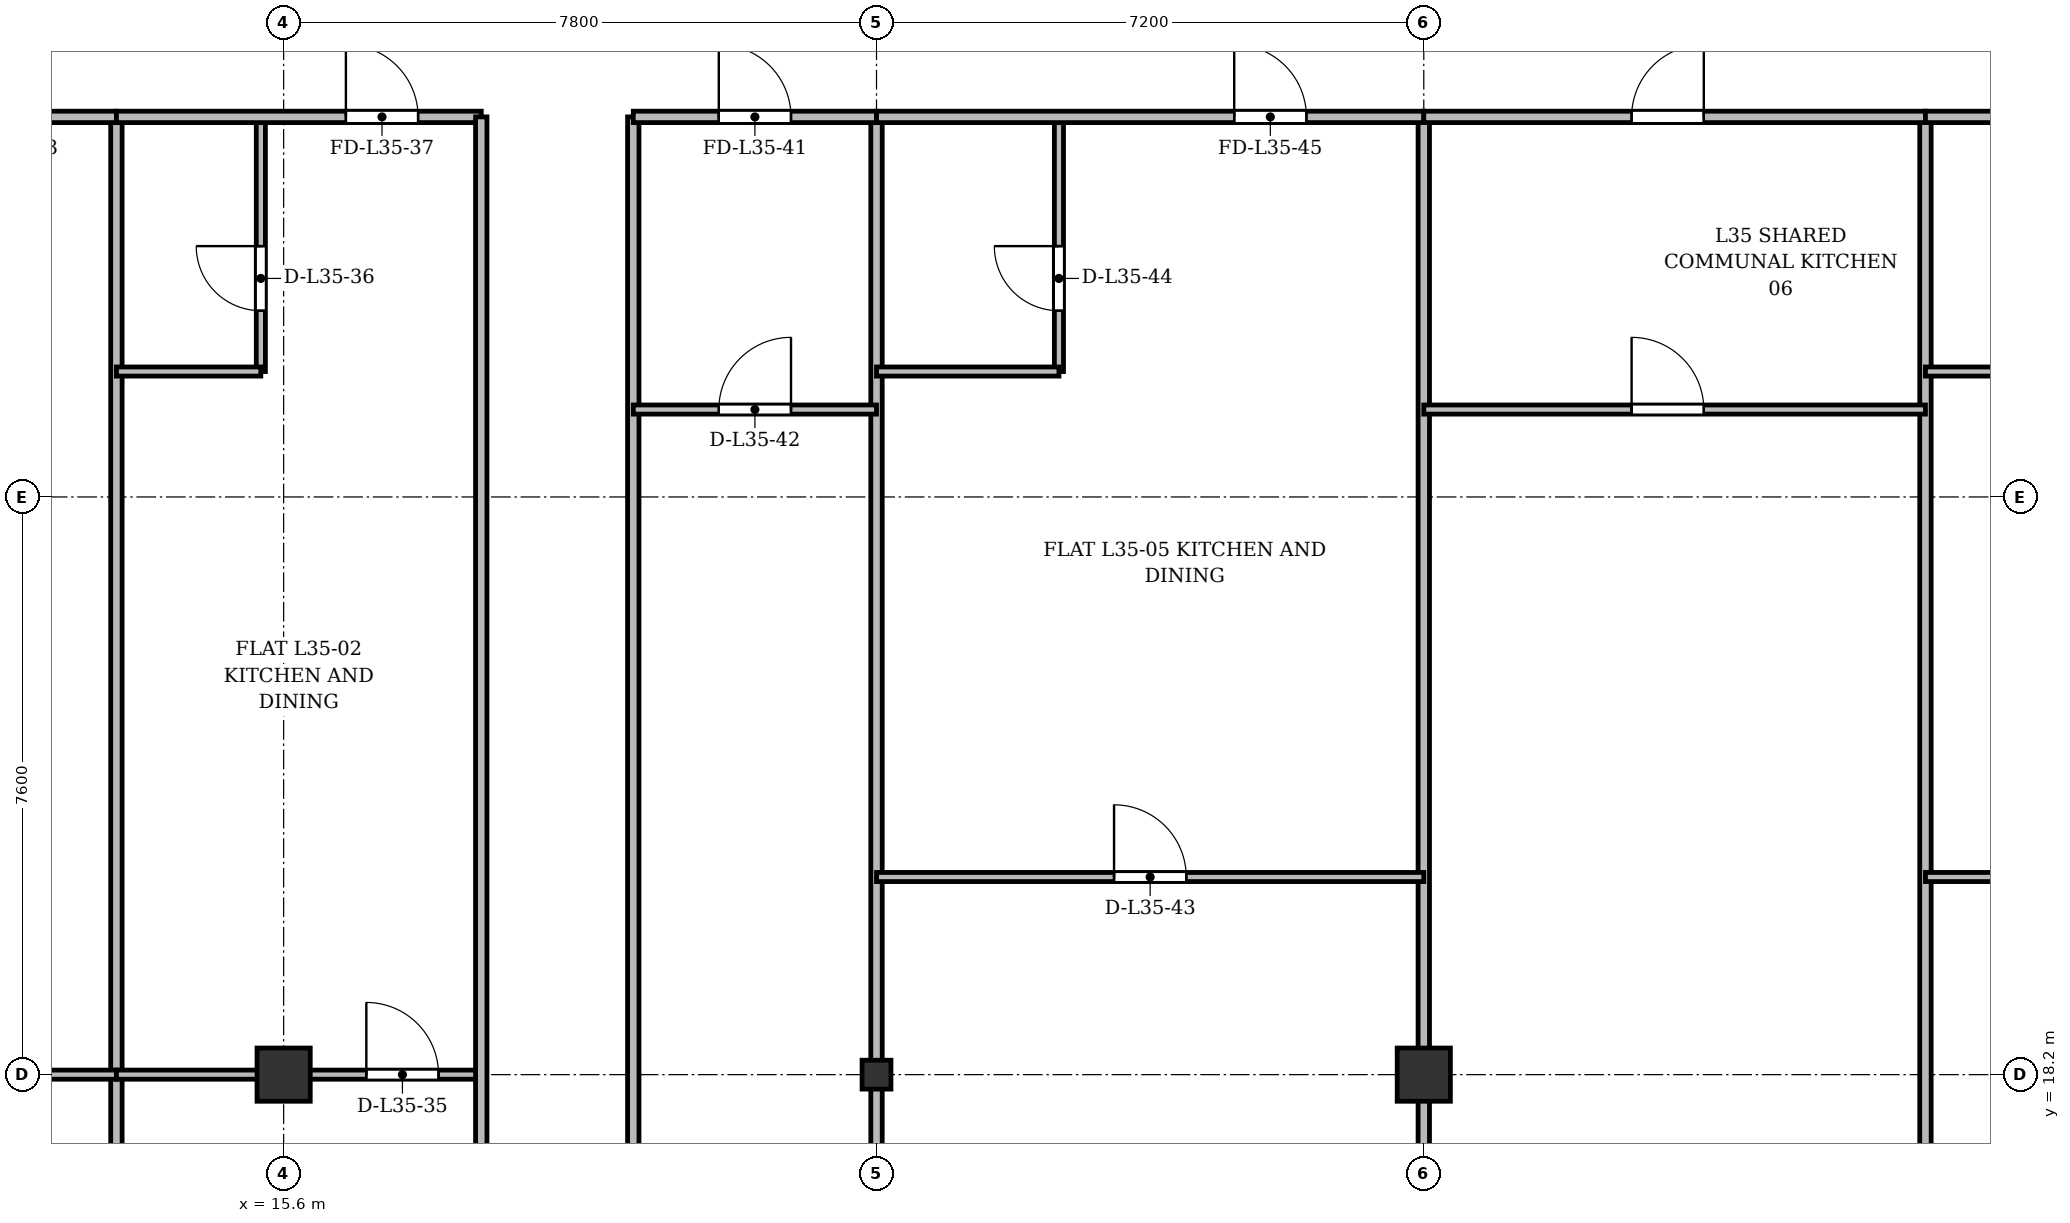
"""IFC4 building model, lengths in metres.
Left out: names, types, materials, properties, quantities, classifications, styles, units other than length and angle.
Written with IfcOpenShell. Run it as: python <this file> out.ifc"""

import sys

from ifc_helpers import new_model, si_unit, direction, frame, frame_2d, origin, origin_2d, place, context, subcontext, project, spatial, rectangle, i_section, extrude, source, transform, mapped, element, fill, save


model = new_model("IFC4")
c1 = context("Model", 3, precision=1e-05, world=origin(), true_north=direction((0.0, 1.0)))
c2 = subcontext(c1, "Body", "Model", "MODEL_VIEW")
j1 = project(units=[si_unit("LENGTHUNIT", "METRE"), si_unit("PLANEANGLEUNIT", "RADIAN")], contexts=[c1])
p1 = place(None, origin())
s1 = spatial("IfcSite", under=j1, at=p1, CompositionType="ELEMENT")
p2 = place(p1, origin())
s2 = spatial("IfcBuilding", under=s1, at=p2, CompositionType="ELEMENT")
p3 = place(p2, frame((0.0, 0.0, 135.7)))
s3 = spatial("IfcBuildingStorey", under=s2, at=p3, CompositionType="ELEMENT", Elevation=135.7)
m1 = source(origin(), c2, "Body", "SweptSolid", [
    extrude(rectangle(XDim=0.7, YDim=0.7, at=origin_2d()), origin(), (0.0, 0.0, 1.0), 3.6),
])
p4 = place(p3, frame((15.6, 18.2, 0.0), z_axis=(0.0, 0.0, 1.0), x_axis=(1.0, 0.0, 0.0)))
e1 = element("IfcColumn", 1, at=p4, inside=s3, PredefinedType="COLUMN", context=c2, shape_type="MappedRepresentation", body=[
    mapped(m1, transform((0.0, 0.0, 0.0), x_axis=(1.0, 0.0, 0.0), y_axis=(0.0, 1.0, 0.0), z_axis=(0.0, 0.0, 1.0), scale=1.0)),
])
m2 = source(origin(), c2, "Body", "SweptSolid", [
    extrude(i_section(OverallWidth=0.38, OverallDepth=0.38, WebThickness=0.02, FlangeThickness=0.03, at=origin_2d()), origin(), (0.0, 0.0, 1.0), 3.6),
])
p5 = place(p3, frame((23.4, 18.2, 0.0), z_axis=(0.0, 0.0, 1.0), x_axis=(1.0, 0.0, 0.0)))
e2 = element("IfcColumn", 2, at=p5, inside=s3, PredefinedType="COLUMN", context=c2, shape_type="MappedRepresentation", body=[
    mapped(m2, transform((0.0, 0.0, 0.0), x_axis=(1.0, 0.0, 0.0), y_axis=(0.0, 1.0, 0.0), z_axis=(0.0, 0.0, 1.0), scale=1.0)),
])
p6 = place(p3, frame((30.6, 18.2, 0.0), z_axis=(0.0, 0.0, 1.0), x_axis=(1.0, 0.0, 0.0)))
e3 = element("IfcColumn", 3, at=p6, inside=s3, PredefinedType="COLUMN", context=c2, shape_type="MappedRepresentation", body=[
    mapped(m1, transform((0.0, 0.0, 0.0), x_axis=(1.0, 0.0, 0.0), y_axis=(0.0, 1.0, 0.0), z_axis=(0.0, 0.0, 1.0), scale=1.0)),
])
p7 = place(p3, frame((13.4, 3.525, 0.0), z_axis=(0.0, 0.0, 1.0), x_axis=(0.0, 1.0, 0.0)))
e4 = element("IfcWall", 4, at=p7, inside=s3, PredefinedType="PARTITIONING", context=c2, shape_type="SweptSolid", body=[
    extrude(rectangle(XDim=27.275, YDim=0.15, at=frame_2d((13.638, 0.0))), origin(), (0.0, 0.0, 1.0), 2.75),
])
for number, where, z_axis, x_axis in (
    (5, (23.4, 3.525, 0.0), (0.0, 0.0, 1.0), (0.0, 1.0, 0.0)),
    (6, (30.6, 3.525, 0.0), (0.0, 0.0, 1.0), (0.0, 1.0, 0.0)),
):
    element("IfcWall", number, at=place(p3, frame(where, z_axis=z_axis, x_axis=x_axis)), inside=s3, PredefinedType="PARTITIONING", context=c2, shape_type="SweptSolid", body=[
        extrude(rectangle(XDim=27.275, YDim=0.15, at=frame_2d((13.638, 0.0))), origin(), (0.0, 0.0, 1.0), 2.85),
    ])
p8 = place(p3, frame((37.2, 3.525, 0.0), z_axis=(0.0, 0.0, 1.0), x_axis=(0.0, 1.0, 0.0)))
e7 = element("IfcWall", 7, at=p8, inside=s3, PredefinedType="PARTITIONING", context=c2, shape_type="SweptSolid", body=[
    extrude(rectangle(XDim=27.275, YDim=0.15, at=frame_2d((13.638, 0.0))), origin(), (0.0, 0.0, 1.0), 2.75),
])
p9 = place(p3, frame((8.04, 18.2, 0.0), z_axis=(0.0, 0.0, 1.0), x_axis=(1.0, 0.0, 0.0)))
e8 = element("IfcWall", 8, at=p9, inside=s3, PredefinedType="PARTITIONING", context=c2, shape_type="SweptSolid", body=[
    extrude(rectangle(XDim=5.36, YDim=0.12, at=frame_2d((2.68, 0.0))), origin(), (0.0, 0.0, 1.0), 2.75),
])
p10 = place(p9, frame((2.205, 0.0, 0.0)))
e9 = element("IfcOpeningElement", 9, at=p10, cuts=e8, PredefinedType="OPENING", context=c2, shape_type="SweptSolid", body=[
    extrude(rectangle(XDim=0.95, YDim=2.15, at=frame_2d((0.475, 1.075))), frame((0.0, 0.07, 0.0), z_axis=(0.0, -1.0, 0.0), x_axis=(1.0, 0.0, 0.0)), (0.0, 0.0, 1.0), 0.14),
])
p11 = place(p3, frame((8.025, 30.8, 0.0), z_axis=(0.0, 0.0, 1.0), x_axis=(1.0, 0.0, 0.0)))
e10 = element("IfcWall", 10, at=p11, inside=s3, PredefinedType="PARTITIONING", context=c2, shape_type="SweptSolid", body=[
    extrude(rectangle(XDim=5.375, YDim=0.15, at=frame_2d((2.688, 0.0))), origin(), (0.0, 0.0, 1.0), 2.85),
])
p12 = place(p11, frame((3.44, 0.0, 0.0)))
e11 = element("IfcOpeningElement", 11, at=p12, cuts=e10, PredefinedType="OPENING", context=c2, shape_type="SweptSolid", body=[
    extrude(rectangle(XDim=0.95, YDim=2.15, at=frame_2d((0.475, 1.075))), frame((0.0, 0.085, 0.0), z_axis=(0.0, -1.0, 0.0), x_axis=(1.0, 0.0, 0.0)), (0.0, 0.0, 1.0), 0.17),
])
p13 = place(p3, frame((13.4, 18.2, 0.0), z_axis=(0.0, 0.0, 1.0), x_axis=(1.0, 0.0, 0.0)))
e12 = element("IfcWall", 12, at=p13, inside=s3, PredefinedType="PARTITIONING", context=c2, shape_type="SweptSolid", body=[
    extrude(rectangle(XDim=4.8, YDim=0.12, at=frame_2d((2.4, 0.0))), origin(), (0.0, 0.0, 1.0), 2.75),
])
p14 = place(p13, frame((3.288, 0.0, 0.0)))
e13 = element("IfcOpeningElement", 13, at=p14, cuts=e12, PredefinedType="OPENING", context=c2, shape_type="SweptSolid", body=[
    extrude(rectangle(XDim=0.95, YDim=2.15, at=frame_2d((0.475, 1.075))), frame((0.0, 0.07, 0.0), z_axis=(0.0, -1.0, 0.0), x_axis=(1.0, 0.0, 0.0)), (0.0, 0.0, 1.0), 0.14),
])
p15 = place(p3, frame((15.3, 27.45, 0.0), z_axis=(0.0, 0.0, 1.0), x_axis=(0.0, 1.0, 0.0)))
e14 = element("IfcWall", 14, at=p15, inside=s3, PredefinedType="PARTITIONING", context=c2, shape_type="SweptSolid", body=[
    extrude(rectangle(XDim=3.35, YDim=0.12, at=frame_2d((1.675, 0.0))), origin(), (0.0, 0.0, 1.0), 3.35),
])
p16 = place(p15, frame((0.8, 0.0, 0.0)))
e15 = element("IfcOpeningElement", 15, at=p16, cuts=e14, PredefinedType="OPENING", context=c2, shape_type="SweptSolid", body=[
    extrude(rectangle(XDim=0.85, YDim=2.1, at=frame_2d((0.425, 1.05))), frame((0.0, 0.07, 0.0), z_axis=(0.0, -1.0, 0.0), x_axis=(1.0, 0.0, 0.0)), (0.0, 0.0, 1.0), 0.14),
])
p17 = place(p3, frame((13.4, 27.45, 0.0), z_axis=(0.0, 0.0, 1.0), x_axis=(1.0, 0.0, 0.0)))
e16 = element("IfcWall", 16, at=p17, inside=s3, PredefinedType="PARTITIONING", context=c2, shape_type="SweptSolid", body=[
    extrude(rectangle(XDim=1.9, YDim=0.12, at=frame_2d((0.95, 0.0))), origin(), (0.0, 0.0, 1.0), 3.35),
])
p18 = place(p3, frame((13.4, 30.8, 0.0), z_axis=(0.0, 0.0, 1.0), x_axis=(1.0, 0.0, 0.0)))
e17 = element("IfcWall", 17, at=p18, inside=s3, PredefinedType="PARTITIONING", context=c2, shape_type="SweptSolid", body=[
    extrude(rectangle(XDim=4.8, YDim=0.15, at=frame_2d((2.4, 0.0))), origin(), (0.0, 0.0, 1.0), 2.85),
])
p19 = place(p18, frame((3.019, 0.0, 0.0)))
e18 = element("IfcOpeningElement", 18, at=p19, cuts=e17, PredefinedType="OPENING", context=c2, shape_type="SweptSolid", body=[
    extrude(rectangle(XDim=0.95, YDim=2.15, at=frame_2d((0.475, 1.075))), frame((0.0, 0.085, 0.0), z_axis=(0.0, -1.0, 0.0), x_axis=(1.0, 0.0, 0.0)), (0.0, 0.0, 1.0), 0.17),
])
for number, where, z_axis, x_axis in (
    (19, (18.2, 3.525, 0.0), (0.0, 0.0, 1.0), (0.0, 1.0, 0.0)),
    (20, (20.2, 3.525, 0.0), (0.0, 0.0, 1.0), (0.0, 1.0, 0.0)),
):
    element("IfcWall", number, at=place(p3, frame(where, z_axis=z_axis, x_axis=x_axis)), inside=s3, PredefinedType="PARTITIONING", context=c2, shape_type="SweptSolid", body=[
        extrude(rectangle(XDim=27.275, YDim=0.15, at=frame_2d((13.638, 0.0))), origin(), (0.0, 0.0, 1.0), 2.75),
    ])
p20 = place(p3, frame((20.2, 30.8, 0.0), z_axis=(0.0, 0.0, 1.0), x_axis=(1.0, 0.0, 0.0)))
e21 = element("IfcWall", 21, at=p20, inside=s3, PredefinedType="PARTITIONING", context=c2, shape_type="SweptSolid", body=[
    extrude(rectangle(XDim=3.2, YDim=0.15, at=frame_2d((1.6, 0.0))), origin(), (0.0, 0.0, 1.0), 2.85),
])
p21 = place(p20, frame((1.125, 0.0, 0.0)))
e22 = element("IfcOpeningElement", 22, at=p21, cuts=e21, PredefinedType="OPENING", context=c2, shape_type="SweptSolid", body=[
    extrude(rectangle(XDim=0.95, YDim=2.15, at=frame_2d((0.475, 1.075))), frame((0.0, 0.085, 0.0), z_axis=(0.0, -1.0, 0.0), x_axis=(1.0, 0.0, 0.0)), (0.0, 0.0, 1.0), 0.17),
])
p22 = place(p3, frame((20.2, 26.95, 0.0), z_axis=(0.0, 0.0, 1.0), x_axis=(1.0, 0.0, 0.0)))
e23 = element("IfcWall", 23, at=p22, inside=s3, PredefinedType="PARTITIONING", context=c2, shape_type="SweptSolid", body=[
    extrude(rectangle(XDim=3.2, YDim=0.12, at=frame_2d((1.6, 0.0))), origin(), (0.0, 0.0, 1.0), 2.85),
])
p23 = place(p22, frame((1.125, 0.0, 0.0)))
e24 = element("IfcOpeningElement", 24, at=p23, cuts=e23, PredefinedType="OPENING", context=c2, shape_type="SweptSolid", body=[
    extrude(rectangle(XDim=0.95, YDim=2.15, at=frame_2d((0.475, 1.075))), frame((0.0, 0.07, 0.0), z_axis=(0.0, -1.0, 0.0), x_axis=(1.0, 0.0, 0.0)), (0.0, 0.0, 1.0), 0.14),
])
p24 = place(p3, frame((23.4, 20.8, 0.0), z_axis=(0.0, 0.0, 1.0), x_axis=(1.0, 0.0, 0.0)))
e25 = element("IfcWall", 25, at=p24, inside=s3, PredefinedType="PARTITIONING", context=c2, shape_type="SweptSolid", body=[
    extrude(rectangle(XDim=7.2, YDim=0.12, at=frame_2d((3.6, 0.0))), origin(), (0.0, 0.0, 1.0), 2.85),
])
p25 = place(p24, frame((3.125, 0.0, 0.0)))
e26 = element("IfcOpeningElement", 26, at=p25, cuts=e25, PredefinedType="OPENING", context=c2, shape_type="SweptSolid", body=[
    extrude(rectangle(XDim=0.95, YDim=2.15, at=frame_2d((0.475, 1.075))), frame((0.0, 0.07, 0.0), z_axis=(0.0, -1.0, 0.0), x_axis=(1.0, 0.0, 0.0)), (0.0, 0.0, 1.0), 0.14),
])
p26 = place(p3, frame((25.8, 27.45, 0.0), z_axis=(0.0, 0.0, 1.0), x_axis=(0.0, 1.0, 0.0)))
e27 = element("IfcWall", 27, at=p26, inside=s3, PredefinedType="PARTITIONING", context=c2, shape_type="SweptSolid", body=[
    extrude(rectangle(XDim=3.35, YDim=0.12, at=frame_2d((1.675, 0.0))), origin(), (0.0, 0.0, 1.0), 3.35),
])
p27 = place(p26, frame((0.8, 0.0, 0.0)))
e28 = element("IfcOpeningElement", 28, at=p27, cuts=e27, PredefinedType="OPENING", context=c2, shape_type="SweptSolid", body=[
    extrude(rectangle(XDim=0.85, YDim=2.1, at=frame_2d((0.425, 1.05))), frame((0.0, 0.07, 0.0), z_axis=(0.0, -1.0, 0.0), x_axis=(1.0, 0.0, 0.0)), (0.0, 0.0, 1.0), 0.14),
])
p28 = place(p3, frame((23.4, 27.45, 0.0), z_axis=(0.0, 0.0, 1.0), x_axis=(1.0, 0.0, 0.0)))
e29 = element("IfcWall", 29, at=p28, inside=s3, PredefinedType="PARTITIONING", context=c2, shape_type="SweptSolid", body=[
    extrude(rectangle(XDim=2.4, YDim=0.12, at=frame_2d((1.2, 0.0))), origin(), (0.0, 0.0, 1.0), 2.85),
])
p29 = place(p3, frame((23.4, 30.8, 0.0), z_axis=(0.0, 0.0, 1.0), x_axis=(1.0, 0.0, 0.0)))
e30 = element("IfcWall", 30, at=p29, inside=s3, PredefinedType="PARTITIONING", context=c2, shape_type="SweptSolid", body=[
    extrude(rectangle(XDim=7.2, YDim=0.15, at=frame_2d((3.6, 0.0))), origin(), (0.0, 0.0, 1.0), 2.85),
])
p30 = place(p29, frame((4.706, 0.0, 0.0)))
e31 = element("IfcOpeningElement", 31, at=p30, cuts=e30, PredefinedType="OPENING", context=c2, shape_type="SweptSolid", body=[
    extrude(rectangle(XDim=0.95, YDim=2.15, at=frame_2d((0.475, 1.075))), frame((0.0, 0.085, 0.0), z_axis=(0.0, -1.0, 0.0), x_axis=(1.0, 0.0, 0.0)), (0.0, 0.0, 1.0), 0.17),
])
p31 = place(p3, frame((30.6, 30.8, 0.0), z_axis=(0.0, 0.0, 1.0), x_axis=(1.0, 0.0, 0.0)))
e32 = element("IfcWall", 32, at=p31, inside=s3, PredefinedType="PARTITIONING", context=c2, shape_type="SweptSolid", body=[
    extrude(rectangle(XDim=6.6, YDim=0.15, at=frame_2d((3.3, 0.0))), origin(), (0.0, 0.0, 1.0), 2.85),
])
p32 = place(p31, frame((2.734, 0.0, 0.0)))
e33 = element("IfcOpeningElement", 33, at=p32, cuts=e32, PredefinedType="OPENING", context=c2, shape_type="SweptSolid", body=[
    extrude(rectangle(XDim=0.95, YDim=2.15, at=frame_2d((0.475, 1.075))), frame((0.0, 0.085, 0.0), z_axis=(0.0, -1.0, 0.0), x_axis=(1.0, 0.0, 0.0)), (0.0, 0.0, 1.0), 0.17),
])
p33 = place(p3, frame((30.6, 26.95, 0.0), z_axis=(0.0, 0.0, 1.0), x_axis=(1.0, 0.0, 0.0)))
e34 = element("IfcWall", 34, at=p33, inside=s3, PredefinedType="PARTITIONING", context=c2, shape_type="SweptSolid", body=[
    extrude(rectangle(XDim=6.6, YDim=0.12, at=frame_2d((3.3, 0.0))), origin(), (0.0, 0.0, 1.0), 2.85),
])
p34 = place(p33, frame((2.734, 0.0, 0.0)))
e35 = element("IfcOpeningElement", 35, at=p34, cuts=e34, PredefinedType="OPENING", context=c2, shape_type="SweptSolid", body=[
    extrude(rectangle(XDim=0.95, YDim=2.15, at=frame_2d((0.475, 1.075))), frame((0.0, 0.07, 0.0), z_axis=(0.0, -1.0, 0.0), x_axis=(1.0, 0.0, 0.0)), (0.0, 0.0, 1.0), 0.14),
])
p35 = place(p3, frame((37.2, 20.8, 0.0), z_axis=(0.0, 0.0, 1.0), x_axis=(1.0, 0.0, 0.0)))
e36 = element("IfcWall", 36, at=p35, inside=s3, PredefinedType="PARTITIONING", context=c2, shape_type="SweptSolid", body=[
    extrude(rectangle(XDim=6.6, YDim=0.12, at=frame_2d((3.3, 0.0))), origin(), (0.0, 0.0, 1.0), 2.85),
])
p36 = place(p35, frame((2.734, 0.0, 0.0)))
e37 = element("IfcOpeningElement", 37, at=p36, cuts=e36, PredefinedType="OPENING", context=c2, shape_type="SweptSolid", body=[
    extrude(rectangle(XDim=0.95, YDim=2.15, at=frame_2d((0.475, 1.075))), frame((0.0, 0.07, 0.0), z_axis=(0.0, -1.0, 0.0), x_axis=(1.0, 0.0, 0.0)), (0.0, 0.0, 1.0), 0.14),
])
p37 = place(p3, frame((37.2, 27.45, 0.0), z_axis=(0.0, 0.0, 1.0), x_axis=(1.0, 0.0, 0.0)))
e38 = element("IfcWall", 38, at=p37, inside=s3, PredefinedType="PARTITIONING", context=c2, shape_type="SweptSolid", body=[
    extrude(rectangle(XDim=2.294, YDim=0.12, at=frame_2d((1.147, 0.0))), origin(), (0.0, 0.0, 1.0), 3.35),
])
p38 = place(p3, frame((37.2, 30.8, 0.0), z_axis=(0.0, 0.0, 1.0), x_axis=(1.0, 0.0, 0.0)))
e39 = element("IfcWall", 39, at=p38, inside=s3, PredefinedType="PARTITIONING", context=c2, shape_type="SweptSolid", body=[
    extrude(rectangle(XDim=6.6, YDim=0.15, at=frame_2d((3.3, 0.0))), origin(), (0.0, 0.0, 1.0), 2.85),
])
p39 = place(p38, frame((4.337, 0.0, 0.0)))
e40 = element("IfcOpeningElement", 40, at=p39, cuts=e39, PredefinedType="OPENING", context=c2, shape_type="SweptSolid", body=[
    extrude(rectangle(XDim=0.95, YDim=2.15, at=frame_2d((0.475, 1.075))), frame((0.0, 0.085, 0.0), z_axis=(0.0, -1.0, 0.0), x_axis=(1.0, 0.0, 0.0)), (0.0, 0.0, 1.0), 0.17),
])
m3 = source(origin(), c2, "Body", "SweptSolid", [
    extrude(rectangle(XDim=0.95, YDim=2.15, at=frame_2d((0.475, 1.075))), frame((0.0, 0.025, 0.0), z_axis=(0.0, -1.0, 0.0), x_axis=(1.0, 0.0, 0.0)), (0.0, 0.0, 1.0), 0.05),
])
p40 = place(p14, origin())
e41 = element("IfcDoor", 41, at=p40, inside=s3, OperationType="SINGLE_SWING_LEFT", PredefinedType="DOOR", context=c2, shape_type="MappedRepresentation", body=[
    mapped(m3, transform((0.0, 0.0, 0.0), x_axis=(1.0, 0.0, 0.0), y_axis=(0.0, 1.0, 0.0), z_axis=(0.0, 0.0, 1.0), scale=1.0)),
])
fill(e13, e41)
m4 = source(origin(), c2, "Body", "SweptSolid", [
    extrude(rectangle(XDim=0.85, YDim=2.1, at=frame_2d((0.425, 1.05))), frame((0.0, 0.025, 0.0), z_axis=(0.0, -1.0, 0.0), x_axis=(1.0, 0.0, 0.0)), (0.0, 0.0, 1.0), 0.05),
])
p41 = place(p16, origin())
e42 = element("IfcDoor", 42, at=p41, inside=s3, OperationType="SINGLE_SWING_RIGHT", PredefinedType="DOOR", context=c2, shape_type="MappedRepresentation", body=[
    mapped(m4, transform((0.0, 0.0, 0.0), x_axis=(1.0, 0.0, 0.0), y_axis=(0.0, 1.0, 0.0), z_axis=(0.0, 0.0, 1.0), scale=1.0)),
])
fill(e15, e42)
p42 = place(p19, origin())
e43 = element("IfcDoor", 43, at=p42, inside=s3, OperationType="SINGLE_SWING_LEFT", PredefinedType="DOOR", context=c2, shape_type="MappedRepresentation", body=[
    mapped(m3, transform((0.0, 0.0, 0.0), x_axis=(1.0, 0.0, 0.0), y_axis=(0.0, 1.0, 0.0), z_axis=(0.0, 0.0, 1.0), scale=1.0)),
])
fill(e18, e43)
p43 = place(p21, origin())
e44 = element("IfcDoor", 44, at=p43, inside=s3, OperationType="SINGLE_SWING_LEFT", PredefinedType="DOOR", context=c2, shape_type="MappedRepresentation", body=[
    mapped(m3, transform((0.0, 0.0, 0.0), x_axis=(1.0, 0.0, 0.0), y_axis=(0.0, 1.0, 0.0), z_axis=(0.0, 0.0, 1.0), scale=1.0)),
])
fill(e22, e44)
p44 = place(p23, origin())
e45 = element("IfcDoor", 45, at=p44, inside=s3, OperationType="SINGLE_SWING_RIGHT", PredefinedType="DOOR", context=c2, shape_type="MappedRepresentation", body=[
    mapped(m3, transform((0.0, 0.0, 0.0), x_axis=(1.0, 0.0, 0.0), y_axis=(0.0, 1.0, 0.0), z_axis=(0.0, 0.0, 1.0), scale=1.0)),
])
fill(e24, e45)
p45 = place(p25, origin())
e46 = element("IfcDoor", 46, at=p45, inside=s3, OperationType="SINGLE_SWING_LEFT", PredefinedType="DOOR", context=c2, shape_type="MappedRepresentation", body=[
    mapped(m3, transform((0.0, 0.0, 0.0), x_axis=(1.0, 0.0, 0.0), y_axis=(0.0, 1.0, 0.0), z_axis=(0.0, 0.0, 1.0), scale=1.0)),
])
fill(e26, e46)
p46 = place(p27, origin())
e47 = element("IfcDoor", 47, at=p46, inside=s3, OperationType="SINGLE_SWING_RIGHT", PredefinedType="DOOR", context=c2, shape_type="MappedRepresentation", body=[
    mapped(m4, transform((0.0, 0.0, 0.0), x_axis=(1.0, 0.0, 0.0), y_axis=(0.0, 1.0, 0.0), z_axis=(0.0, 0.0, 1.0), scale=1.0)),
])
fill(e28, e47)
p47 = place(p30, origin())
e48 = element("IfcDoor", 48, at=p47, inside=s3, OperationType="SINGLE_SWING_LEFT", PredefinedType="DOOR", context=c2, shape_type="MappedRepresentation", body=[
    mapped(m3, transform((0.0, 0.0, 0.0), x_axis=(1.0, 0.0, 0.0), y_axis=(0.0, 1.0, 0.0), z_axis=(0.0, 0.0, 1.0), scale=1.0)),
])
fill(e31, e48)
p48 = place(p32, origin())
e49 = element("IfcDoor", 49, at=p48, inside=s3, OperationType="SINGLE_SWING_RIGHT", PredefinedType="DOOR", context=c2, shape_type="MappedRepresentation", body=[
    mapped(m3, transform((0.0, 0.0, 0.0), x_axis=(1.0, 0.0, 0.0), y_axis=(0.0, 1.0, 0.0), z_axis=(0.0, 0.0, 1.0), scale=1.0)),
])
fill(e33, e49)
p49 = place(p34, origin())
e50 = element("IfcDoor", 50, at=p49, inside=s3, OperationType="SINGLE_SWING_LEFT", PredefinedType="DOOR", context=c2, shape_type="MappedRepresentation", body=[
    mapped(m3, transform((0.0, 0.0, 0.0), x_axis=(1.0, 0.0, 0.0), y_axis=(0.0, 1.0, 0.0), z_axis=(0.0, 0.0, 1.0), scale=1.0)),
])
fill(e35, e50)
save(model, sys.argv[1])
